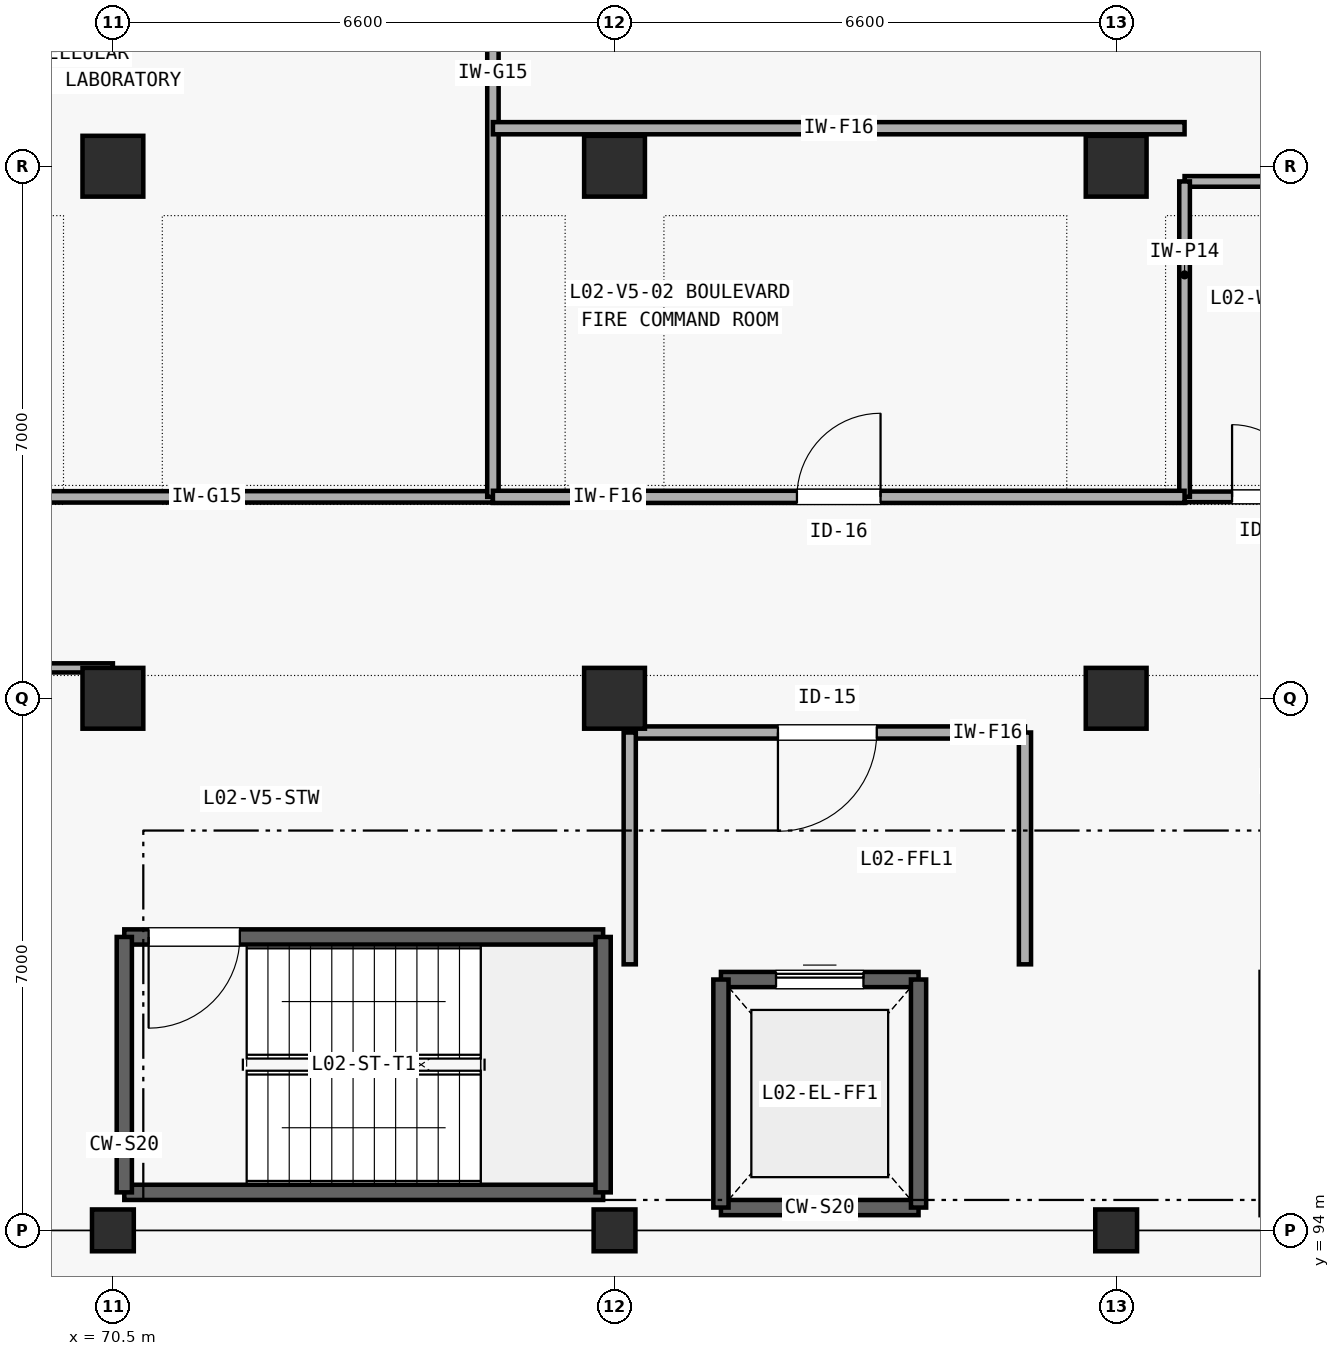
"""IFC4 building model, lengths in metres.
Left out: names, types, materials, properties, quantities, classifications, styles, units other than length and angle.
Written with IfcOpenShell. Run it as: python <this file> out.ifc"""

import sys

from ifc_helpers import new_model, si_unit, direction, frame, frame_2d, origin, origin_2d, place, context, subcontext, project, spatial, rectangle, extrude, element, fill, save


model = new_model("IFC4")
c1 = context("Model", 3, precision=1e-05, world=origin(), true_north=direction((0.0, 1.0)))
c2 = subcontext(c1, "Body", "Model", "MODEL_VIEW")
j1 = project(units=[si_unit("LENGTHUNIT", "METRE"), si_unit("PLANEANGLEUNIT", "RADIAN")], contexts=[c1])
p1 = place(None, origin())
s1 = spatial("IfcSite", under=j1, at=p1, CompositionType="ELEMENT")
p2 = place(p1, origin())
s2 = spatial("IfcBuilding", under=s1, at=p2, CompositionType="ELEMENT")
p3 = place(p2, frame((0.0, 0.0, 8.4)))
s3 = spatial("IfcBuildingStorey", under=s2, at=p3, CompositionType="ELEMENT", Elevation=8.4)
p4 = place(p3, frame((70.5, 94.0, 0.0), z_axis=(0.0, 0.0, 1.0), x_axis=(1.0, 0.0, 0.0)))
e1 = element("IfcColumn", 1, at=p4, inside=s3, PredefinedType="COLUMN", context=c2, shape_type="SweptSolid", body=[
    extrude(rectangle(XDim=0.55, YDim=0.55, at=origin_2d()), origin(), (0.0, 0.0, 1.0), 4.2),
])
for number, where, z_axis, x_axis in (
    (2, (70.5, 101.0, 0.0), (0.0, 0.0, 1.0), (1.0, 0.0, 0.0)),
    (3, (70.5, 108.0, 0.0), (0.0, 0.0, 1.0), (1.0, 0.0, 0.0)),
):
    element("IfcColumn", number, at=place(p3, frame(where, z_axis=z_axis, x_axis=x_axis)), inside=s3, PredefinedType="COLUMN", context=c2, shape_type="SweptSolid", body=[
        extrude(rectangle(XDim=0.8, YDim=0.8, at=origin_2d()), origin(), (0.0, 0.0, 1.0), 4.2),
    ])
p5 = place(p3, frame((77.1, 94.0, 0.0), z_axis=(0.0, 0.0, 1.0), x_axis=(1.0, 0.0, 0.0)))
e4 = element("IfcColumn", 4, at=p5, inside=s3, PredefinedType="COLUMN", context=c2, shape_type="SweptSolid", body=[
    extrude(rectangle(XDim=0.55, YDim=0.55, at=origin_2d()), origin(), (0.0, 0.0, 1.0), 4.2),
])
for number, where, z_axis, x_axis in (
    (5, (77.1, 101.0, 0.0), (0.0, 0.0, 1.0), (1.0, 0.0, 0.0)),
    (6, (77.1, 108.0, 0.0), (0.0, 0.0, 1.0), (1.0, 0.0, 0.0)),
):
    element("IfcColumn", number, at=place(p3, frame(where, z_axis=z_axis, x_axis=x_axis)), inside=s3, PredefinedType="COLUMN", context=c2, shape_type="SweptSolid", body=[
        extrude(rectangle(XDim=0.8, YDim=0.8, at=origin_2d()), origin(), (0.0, 0.0, 1.0), 4.2),
    ])
p6 = place(p3, frame((83.7, 94.0, 0.0), z_axis=(0.0, 0.0, 1.0), x_axis=(1.0, 0.0, 0.0)))
e7 = element("IfcColumn", 7, at=p6, inside=s3, PredefinedType="COLUMN", context=c2, shape_type="SweptSolid", body=[
    extrude(rectangle(XDim=0.55, YDim=0.55, at=origin_2d()), origin(), (0.0, 0.0, 1.0), 4.2),
])
for number, where, z_axis, x_axis in (
    (8, (83.7, 101.0, 0.0), (0.0, 0.0, 1.0), (1.0, 0.0, 0.0)),
    (9, (83.7, 108.0, 0.0), (0.0, 0.0, 1.0), (1.0, 0.0, 0.0)),
):
    element("IfcColumn", number, at=place(p3, frame(where, z_axis=z_axis, x_axis=x_axis)), inside=s3, PredefinedType="COLUMN", context=c2, shape_type="SweptSolid", body=[
        extrude(rectangle(XDim=0.8, YDim=0.8, at=origin_2d()), origin(), (0.0, 0.0, 1.0), 4.2),
    ])
p7 = place(p3, frame((70.65, 94.5, 0.0), z_axis=(0.0, 0.0, 1.0), x_axis=(1.0, 0.0, 0.0)))
e10 = element("IfcWall", 10, at=p7, inside=s3, PredefinedType="SHEAR", context=c2, shape_type="SweptSolid", body=[
    extrude(rectangle(XDim=6.3, YDim=0.2, at=frame_2d((3.15, 0.0))), origin(), (0.0, 0.0, 1.0), 4.2),
])
p8 = place(p3, frame((70.65, 97.86, 0.0), z_axis=(0.0, 0.0, 1.0), x_axis=(1.0, 0.0, 0.0)))
e11 = element("IfcWall", 11, at=p8, inside=s3, PredefinedType="SHEAR", context=c2, shape_type="SweptSolid", body=[
    extrude(rectangle(XDim=6.3, YDim=0.2, at=frame_2d((3.15, 0.0))), origin(), (0.0, 0.0, 1.0), 4.2),
])
p9 = place(p8, frame((0.32, 0.0, 0.0)))
e12 = element("IfcOpeningElement", 12, at=p9, cuts=e11, PredefinedType="OPENING", context=c2, shape_type="SweptSolid", body=[
    extrude(rectangle(XDim=1.2, YDim=2.15, at=frame_2d((0.6, 1.075))), frame((0.0, 0.11, 0.0), z_axis=(0.0, -1.0, 0.0), x_axis=(1.0, 0.0, 0.0)), (0.0, 0.0, 1.0), 0.22),
])
for number, where, z_axis, x_axis in (
    (13, (70.65, 94.5, 0.0), (0.0, 0.0, 1.0), (0.0, 1.0, 0.0)),
    (14, (76.95, 94.5, 0.0), (0.0, 0.0, 1.0), (0.0, 1.0, 0.0)),
):
    element("IfcWall", number, at=place(p3, frame(where, z_axis=z_axis, x_axis=x_axis)), inside=s3, PredefinedType="SHEAR", context=c2, shape_type="SweptSolid", body=[
        extrude(rectangle(XDim=3.36, YDim=0.2, at=frame_2d((1.68, 0.0))), origin(), (0.0, 0.0, 1.0), 4.2),
    ])
p10 = place(p3, frame((78.5, 94.3, 0.0), z_axis=(0.0, 0.0, 1.0), x_axis=(1.0, 0.0, 0.0)))
e15 = element("IfcWall", 15, at=p10, inside=s3, PredefinedType="SHEAR", context=c2, shape_type="SweptSolid", body=[
    extrude(rectangle(XDim=2.6, YDim=0.2, at=frame_2d((1.3, 0.0))), origin(), (0.0, 0.0, 1.0), 4.2),
])
p11 = place(p3, frame((78.5, 97.3, 0.0), z_axis=(0.0, 0.0, 1.0), x_axis=(1.0, 0.0, 0.0)))
e16 = element("IfcWall", 16, at=p11, inside=s3, PredefinedType="SHEAR", context=c2, shape_type="SweptSolid", body=[
    extrude(rectangle(XDim=2.6, YDim=0.2, at=frame_2d((1.3, 0.0))), origin(), (0.0, 0.0, 1.0), 4.2),
])
p12 = place(p11, frame((0.725, 0.0, 0.0)))
e17 = element("IfcOpeningElement", 17, at=p12, cuts=e16, PredefinedType="OPENING", context=c2, shape_type="SweptSolid", body=[
    extrude(rectangle(XDim=1.15, YDim=2.2, at=frame_2d((0.575, 1.1))), frame((0.0, 0.11, 0.0), z_axis=(0.0, -1.0, 0.0), x_axis=(1.0, 0.0, 0.0)), (0.0, 0.0, 1.0), 0.22),
])
for number, where, z_axis, x_axis in (
    (18, (78.5, 94.3, 0.0), (0.0, 0.0, 1.0), (0.0, 1.0, 0.0)),
    (19, (81.1, 94.3, 0.0), (0.0, 0.0, 1.0), (0.0, 1.0, 0.0)),
):
    element("IfcWall", number, at=place(p3, frame(where, z_axis=z_axis, x_axis=x_axis)), inside=s3, PredefinedType="SHEAR", context=c2, shape_type="SweptSolid", body=[
        extrude(rectangle(XDim=3.0, YDim=0.2, at=frame_2d((1.5, 0.0))), origin(), (0.0, 0.0, 1.0), 4.2),
    ])
p13 = place(p3, frame((85.7, 94.2, 0.0), z_axis=(0.0, 0.0, 1.0), x_axis=(0.0, 1.0, 0.0)))
e20 = element("IfcWall", 20, at=p13, inside=s3, PredefinedType="SHEAR", context=c2, shape_type="SweptSolid", body=[
    extrude(rectangle(XDim=3.2, YDim=0.2, at=frame_2d((1.6, 0.0))), origin(), (0.0, 0.0, 1.0), 4.2),
])
p14 = place(p3, frame((77.3, 100.55, 0.0), z_axis=(0.0, 0.0, 1.0), x_axis=(1.0, 0.0, 0.0)))
e21 = element("IfcWall", 21, at=p14, inside=s3, PredefinedType="SOLIDWALL", context=c2, shape_type="SweptSolid", body=[
    extrude(rectangle(XDim=5.2, YDim=0.16, at=frame_2d((2.6, 0.0))), origin(), (0.0, 0.0, 1.0), 3.9),
])
p15 = place(p14, frame((1.95, 0.0, 0.0)))
e22 = element("IfcOpeningElement", 22, at=p15, cuts=e21, PredefinedType="OPENING", context=c2, shape_type="SweptSolid", body=[
    extrude(rectangle(XDim=1.3, YDim=2.15, at=frame_2d((0.65, 1.075))), frame((0.0, 0.09, 0.0), z_axis=(0.0, -1.0, 0.0), x_axis=(1.0, 0.0, 0.0)), (0.0, 0.0, 1.0), 0.18),
])
p16 = place(p3, frame((77.3, 97.5, 0.0), z_axis=(0.0, 0.0, 1.0), x_axis=(0.0, 1.0, 0.0)))
e23 = element("IfcWall", 23, at=p16, inside=s3, PredefinedType="SOLIDWALL", context=c2, shape_type="SweptSolid", body=[
    extrude(rectangle(XDim=3.05, YDim=0.16, at=frame_2d((1.525, 0.0))), origin(), (0.0, 0.0, 1.0), 3.405),
])
p17 = place(p3, frame((82.5, 97.5, 0.0), z_axis=(0.0, 0.0, 1.0), x_axis=(0.0, 1.0, 0.0)))
e24 = element("IfcWall", 24, at=p17, inside=s3, PredefinedType="SOLIDWALL", context=c2, shape_type="SweptSolid", body=[
    extrude(rectangle(XDim=3.05, YDim=0.16, at=frame_2d((1.525, 0.0))), origin(), (0.0, 0.0, 1.0), 3.9),
])
p18 = place(p3, frame((84.6, 103.65, 0.0), z_axis=(0.0, 0.0, 1.0), x_axis=(1.0, 0.0, 0.0)))
e25 = element("IfcWall", 25, at=p18, inside=s3, PredefinedType="PLUMBINGWALL", context=c2, shape_type="SweptSolid", body=[
    extrude(rectangle(XDim=2.2, YDim=0.14, at=frame_2d((1.1, 0.0))), origin(), (0.0, 0.0, 1.0), 3.9),
])
p19 = place(p18, frame((0.625, 0.0, 0.0)))
e26 = element("IfcOpeningElement", 26, at=p19, cuts=e25, PredefinedType="OPENING", context=c2, shape_type="SweptSolid", body=[
    extrude(rectangle(XDim=0.95, YDim=2.1, at=frame_2d((0.475, 1.05))), frame((0.0, 0.08, 0.0), z_axis=(0.0, -1.0, 0.0), x_axis=(1.0, 0.0, 0.0)), (0.0, 0.0, 1.0), 0.16),
])
p20 = place(p3, frame((84.6, 107.8, 0.0), z_axis=(0.0, 0.0, 1.0), x_axis=(1.0, 0.0, 0.0)))
e27 = element("IfcWall", 27, at=p20, inside=s3, PredefinedType="PLUMBINGWALL", context=c2, shape_type="SweptSolid", body=[
    extrude(rectangle(XDim=2.2, YDim=0.14, at=frame_2d((1.1, 0.0))), origin(), (0.0, 0.0, 1.0), 3.365),
])
p21 = place(p3, frame((84.6, 103.65, 0.0), z_axis=(0.0, 0.0, 1.0), x_axis=(0.0, 1.0, 0.0)))
e28 = element("IfcWall", 28, at=p21, inside=s3, PredefinedType="PLUMBINGWALL", context=c2, shape_type="SweptSolid", body=[
    extrude(rectangle(XDim=4.15, YDim=0.14, at=frame_2d((2.075, 0.0))), origin(), (0.0, 0.0, 1.0), 3.9),
])
p22 = place(p3, frame((57.5, 103.65, 0.0), z_axis=(0.0, 0.0, 1.0), x_axis=(1.0, 0.0, 0.0)))
e29 = element("IfcWall", 29, at=p22, inside=s3, PredefinedType="PARTITIONING", context=c2, shape_type="SweptSolid", body=[
    extrude(rectangle(XDim=18.0, YDim=0.15, at=frame_2d((9.0, 0.0))), origin(), (0.0, 0.0, 1.0), 3.9),
])
p23 = place(p22, frame((8.5, 0.0, 0.0)))
e30 = element("IfcOpeningElement", 30, at=p23, cuts=e29, PredefinedType="OPENING", context=c2, shape_type="SweptSolid", body=[
    extrude(rectangle(XDim=1.0, YDim=2.1, at=frame_2d((0.5, 1.05))), frame((0.0, 0.085, 0.0), z_axis=(0.0, -1.0, 0.0), x_axis=(1.0, 0.0, 0.0)), (0.0, 0.0, 1.0), 0.17),
])
p24 = place(p3, frame((75.5, 103.65, 0.0), z_axis=(0.0, 0.0, 1.0), x_axis=(0.0, 1.0, 0.0)))
e31 = element("IfcWall", 31, at=p24, inside=s3, PredefinedType="PARTITIONING", context=c2, shape_type="SweptSolid", body=[
    extrude(rectangle(XDim=11.15, YDim=0.15, at=frame_2d((5.575, 0.0))), origin(), (0.0, 0.0, 1.0), 3.9),
])
p25 = place(p3, frame((75.5, 103.65, 0.0), z_axis=(0.0, 0.0, 1.0), x_axis=(1.0, 0.0, 0.0)))
e32 = element("IfcWall", 32, at=p25, inside=s3, PredefinedType="SOLIDWALL", context=c2, shape_type="SweptSolid", body=[
    extrude(rectangle(XDim=9.1, YDim=0.16, at=frame_2d((4.55, 0.0))), origin(), (0.0, 0.0, 1.0), 3.9),
])
p26 = place(p25, frame((4.0, 0.0, 0.0)))
e33 = element("IfcOpeningElement", 33, at=p26, cuts=e32, PredefinedType="OPENING", context=c2, shape_type="SweptSolid", body=[
    extrude(rectangle(XDim=1.1, YDim=2.2, at=frame_2d((0.55, 1.1))), frame((0.0, 0.09, 0.0), z_axis=(0.0, -1.0, 0.0), x_axis=(1.0, 0.0, 0.0)), (0.0, 0.0, 1.0), 0.18),
])
p27 = place(p3, frame((75.5, 108.5, 0.0), z_axis=(0.0, 0.0, 1.0), x_axis=(1.0, 0.0, 0.0)))
e34 = element("IfcWall", 34, at=p27, inside=s3, PredefinedType="SOLIDWALL", context=c2, shape_type="SweptSolid", body=[
    extrude(rectangle(XDim=9.1, YDim=0.16, at=frame_2d((4.55, 0.0))), origin(), (0.0, 0.0, 1.0), 3.9),
])
p28 = place(p3, frame((57.5, 101.4, 0.0), z_axis=(0.0, 0.0, 1.0), x_axis=(1.0, 0.0, 0.0)))
e35 = element("IfcWall", 35, at=p28, inside=s3, PredefinedType="PARTITIONING", context=c2, shape_type="SweptSolid", body=[
    extrude(rectangle(XDim=13.0, YDim=0.12, at=frame_2d((6.5, 0.0))), origin(), (0.0, 0.0, 1.0), 3.135),
])
p29 = place(p28, frame((8.225, 0.0, 0.0)))
e36 = element("IfcOpeningElement", 36, at=p29, cuts=e35, PredefinedType="OPENING", context=c2, shape_type="SweptSolid", body=[
    extrude(rectangle(XDim=1.35, YDim=2.2, at=frame_2d((0.675, 1.1))), frame((0.0, 0.07, 0.0), z_axis=(0.0, -1.0, 0.0), x_axis=(1.0, 0.0, 0.0)), (0.0, 0.0, 1.0), 0.14),
])
p30 = place(p9, frame((1.2, 0.0, 0.0), z_axis=(0.0, 0.0, 1.0), x_axis=(-1.0, 0.0, 0.0)))
e37 = element("IfcDoor", 37, at=p30, inside=s3, OperationType="SINGLE_SWING_RIGHT", PredefinedType="DOOR", context=c2, shape_type="SweptSolid", body=[
    extrude(rectangle(XDim=1.2, YDim=2.15, at=frame_2d((0.6, 1.075))), frame((0.0, 0.025, 0.0), z_axis=(0.0, -1.0, 0.0), x_axis=(1.0, 0.0, 0.0)), (0.0, 0.0, 1.0), 0.05),
])
fill(e12, e37)
p31 = place(p12, origin())
e38 = element("IfcDoor", 38, at=p31, inside=s3, OperationType="SLIDING_TO_LEFT", PredefinedType="DOOR", context=c2, shape_type="SweptSolid", body=[
    extrude(rectangle(XDim=1.15, YDim=2.2, at=frame_2d((0.575, 1.1))), frame((0.0, 0.025, 0.0), z_axis=(0.0, -1.0, 0.0), x_axis=(1.0, 0.0, 0.0)), (0.0, 0.0, 1.0), 0.05),
])
fill(e17, e38)
p32 = place(p15, frame((1.3, 0.0, 0.0), z_axis=(0.0, 0.0, 1.0), x_axis=(-1.0, 0.0, 0.0)))
e39 = element("IfcDoor", 39, at=p32, inside=s3, OperationType="SINGLE_SWING_RIGHT", PredefinedType="DOOR", context=c2, shape_type="SweptSolid", body=[
    extrude(rectangle(XDim=1.3, YDim=2.15, at=frame_2d((0.65, 1.075))), frame((0.0, 0.025, 0.0), z_axis=(0.0, -1.0, 0.0), x_axis=(1.0, 0.0, 0.0)), (0.0, 0.0, 1.0), 0.05),
])
fill(e22, e39)
p33 = place(p19, origin())
e40 = element("IfcDoor", 40, at=p33, inside=s3, OperationType="SINGLE_SWING_LEFT", PredefinedType="DOOR", context=c2, shape_type="SweptSolid", body=[
    extrude(rectangle(XDim=0.95, YDim=2.1, at=frame_2d((0.475, 1.05))), frame((0.0, 0.025, 0.0), z_axis=(0.0, -1.0, 0.0), x_axis=(1.0, 0.0, 0.0)), (0.0, 0.0, 1.0), 0.05),
])
fill(e26, e40)
p34 = place(p26, origin())
e41 = element("IfcDoor", 41, at=p34, inside=s3, OperationType="SINGLE_SWING_RIGHT", PredefinedType="DOOR", context=c2, shape_type="SweptSolid", body=[
    extrude(rectangle(XDim=1.1, YDim=2.2, at=frame_2d((0.55, 1.1))), frame((0.0, 0.025, 0.0), z_axis=(0.0, -1.0, 0.0), x_axis=(1.0, 0.0, 0.0)), (0.0, 0.0, 1.0), 0.05),
])
fill(e33, e41)
save(model, sys.argv[1])
